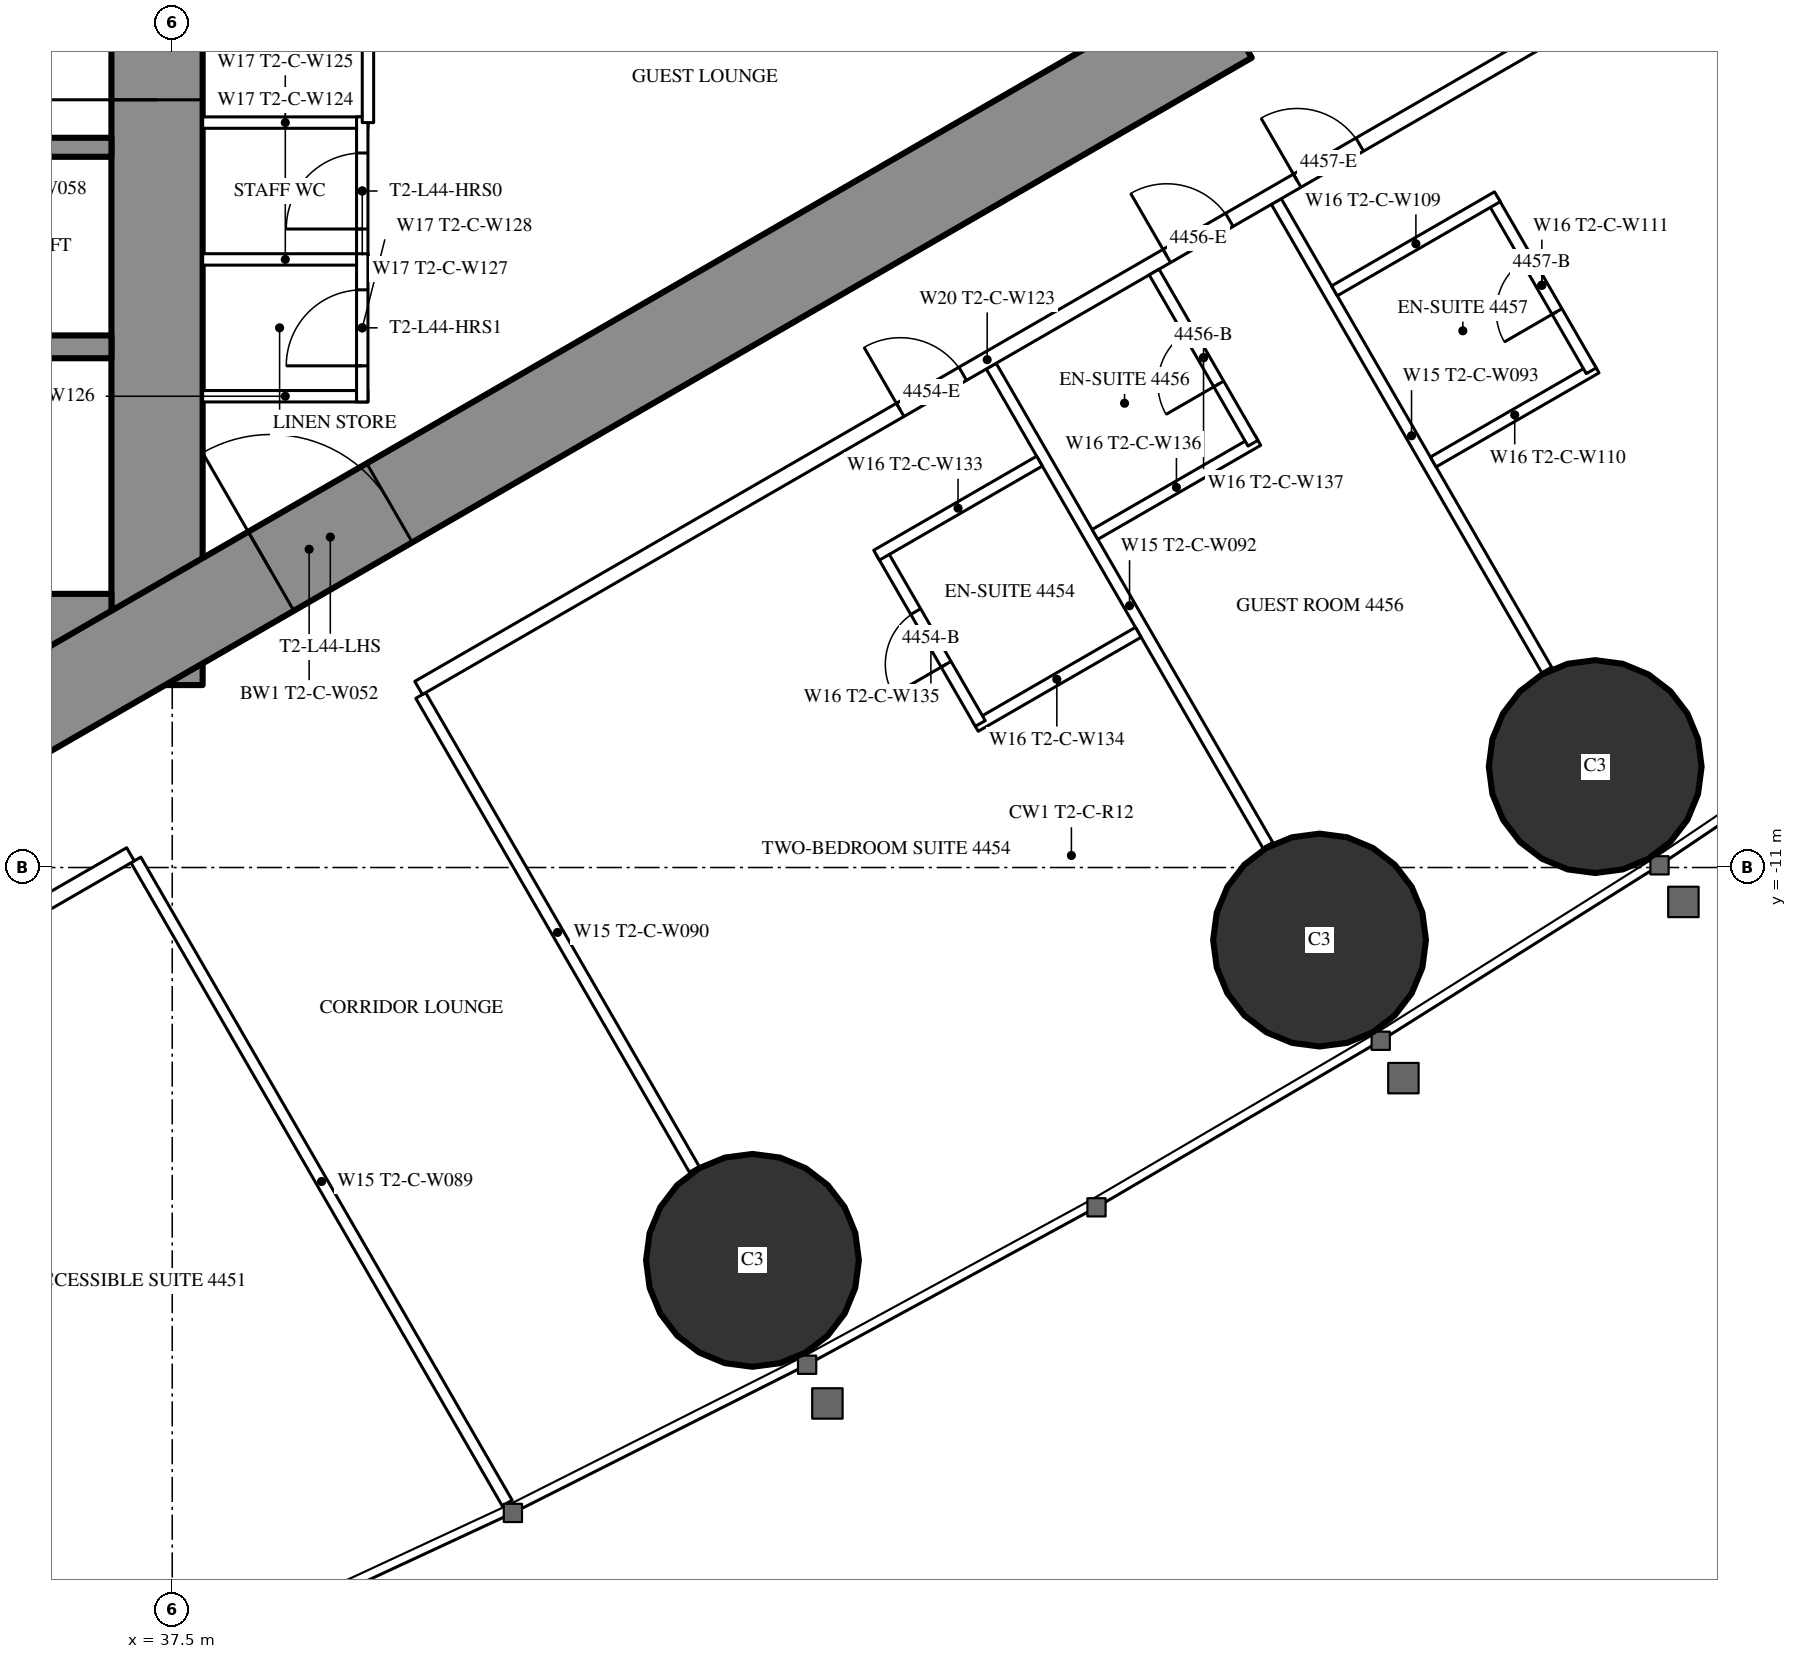
"""IFC4 building model, lengths in metres.
Left out: names, types, materials, properties, quantities, classifications, styles, units other than length and angle.
Written with IfcOpenShell. Run it as: python <this file> out.ifc"""

import sys

from ifc_helpers import new_model, si_unit, direction, frame, frame_2d, origin, origin_2d, place, context, subcontext, project, spatial, rectangle, circle, extrude, element, fill, save


model = new_model("IFC4")
c1 = context("Model", 3, precision=1e-05, world=origin(), true_north=direction((0.0, 1.0)))
c2 = subcontext(c1, "Body", "Model", "MODEL_VIEW")
j1 = project(units=[si_unit("LENGTHUNIT", "METRE"), si_unit("PLANEANGLEUNIT", "RADIAN")], contexts=[c1])
p1 = place(None, origin())
s1 = spatial("IfcSite", under=j1, at=p1, CompositionType="ELEMENT")
p2 = place(p1, origin())
s2 = spatial("IfcBuilding", under=s1, at=p2, CompositionType="ELEMENT")
p3 = place(p2, frame((0.0, 0.0, 166.8)))
s3 = spatial("IfcBuildingStorey", under=s2, at=p3, CompositionType="ELEMENT", Elevation=166.8)
for number, where, z_axis, x_axis in (
    (1, (45.134, -16.168, 0.0), (0.0, 0.0, 1.0), (1.0, 0.0, 0.0)),
    (2, (52.594, -11.955, 0.0), (0.0, 0.0, 1.0), (1.0, 0.0, 0.0)),
    (3, (56.221, -9.672, 0.0), (0.0, 0.0, 1.0), (1.0, 0.0, 0.0)),
):
    element("IfcColumn", number, at=place(p3, frame(where, z_axis=z_axis, x_axis=x_axis)), inside=s3, PredefinedType="COLUMN", context=c2, shape_type="SweptSolid", body=[
        extrude(circle(Radius=1.4, at=origin_2d()), origin(), (0.0, 0.0, 1.0), 3.5),
    ])
p4 = place(p3, frame((37.3, -8.6, 0.0), z_axis=(0.0, 0.0, 1.0), x_axis=(0.0, 1.0, 0.0)))
e4 = element("IfcWall", 4, at=p4, inside=s3, PredefinedType="SHEAR", context=c2, shape_type="SweptSolid", body=[
    extrude(rectangle(XDim=17.2, YDim=1.2, at=frame_2d((8.6, 0.0))), origin(), (0.0, 0.0, 1.0), 3.5),
])
p5 = place(p4, frame((7.7, 0.0, 0.0)))
e5 = element("IfcOpeningElement", 5, at=p5, cuts=e4, PredefinedType="OPENING", context=c2, shape_type="SweptSolid", body=[
    extrude(rectangle(XDim=1.8, YDim=2.2, at=frame_2d((0.9, 1.1))), frame((0.0, 0.61, 0.0), z_axis=(0.0, -1.0, 0.0), x_axis=(1.0, 0.0, 0.0)), (0.0, 0.0, 1.0), 1.22),
])
p6 = place(p3, frame((28.3, -8.0, 0.0), z_axis=(0.0, 0.0, 1.0), x_axis=(1.0, 0.0, 0.0)))
e6 = element("IfcWall", 6, at=p6, inside=s3, PredefinedType="SHEAR", context=c2, shape_type="SweptSolid", body=[
    extrude(rectangle(XDim=8.4, YDim=1.2, at=frame_2d((4.2, 0.0))), origin(), (0.0, 0.0, 1.0), 3.5),
])
p7 = place(p6, frame((0.25, 0.0, 0.0)))
e7 = element("IfcOpeningElement", 7, at=p7, cuts=e6, PredefinedType="OPENING", context=c2, shape_type="SweptSolid", body=[
    extrude(rectangle(XDim=1.0, YDim=2.2, at=frame_2d((0.5, 1.1))), frame((0.0, 0.61, 0.0), z_axis=(0.0, -1.0, 0.0), x_axis=(1.0, 0.0, 0.0)), (0.0, 0.0, 1.0), 1.22),
])
p8 = place(p3, frame((28.3, -4.15, 0.0), z_axis=(0.0, 0.0, 1.0), x_axis=(1.0, 0.0, 0.0)))
e8 = element("IfcWall", 8, at=p8, inside=s3, PredefinedType="SHEAR", context=c2, shape_type="SweptSolid", body=[
    extrude(rectangle(XDim=8.4, YDim=0.3, at=frame_2d((4.2, 0.0))), origin(), (0.0, 0.0, 1.0), 3.5),
])
p9 = place(p3, frame((34.25, -1.525, 0.0), z_axis=(0.0, 0.0, 1.0), x_axis=(1.0, 0.0, 0.0)))
e9 = element("IfcWall", 9, at=p9, inside=s3, PredefinedType="SHEAR", context=c2, shape_type="SweptSolid", body=[
    extrude(rectangle(XDim=2.45, YDim=0.25, at=frame_2d((1.225, 0.0))), origin(), (0.0, 0.0, 1.0), 3.5),
])
p10 = place(p3, frame((27.2, -13.8, 0.0), z_axis=(0.0, 0.0, 1.0), x_axis=(0.866027159892, 0.499996958321, 0.0)))
e10 = element("IfcWall", 10, at=p10, inside=s3, PredefinedType="SHEAR", context=c2, shape_type="SweptSolid", body=[
    extrude(rectangle(XDim=27.947, YDim=1.2, at=frame_2d((13.973, 0.0))), origin(), (0.0, 0.0, 1.0), 3.5),
])
p11 = place(p10, frame((4.6, 0.0, 0.0)))
e11 = element("IfcOpeningElement", 11, at=p11, cuts=e10, PredefinedType="OPENING", context=c2, shape_type="SweptSolid", body=[
    extrude(rectangle(XDim=1.0, YDim=2.2, at=frame_2d((0.5, 1.1))), frame((0.0, 0.61, 0.0), z_axis=(0.0, -1.0, 0.0), x_axis=(1.0, 0.0, 0.0)), (0.0, 0.0, 1.0), 1.22),
])
p12 = place(p10, frame((13.395, 0.0, 0.0)))
e12 = element("IfcOpeningElement", 12, at=p12, cuts=e10, PredefinedType="OPENING", context=c2, shape_type="SweptSolid", body=[
    extrude(rectangle(XDim=1.8, YDim=2.2, at=frame_2d((0.9, 1.1))), frame((0.0, 0.61, 0.0), z_axis=(0.0, -1.0, 0.0), x_axis=(1.0, 0.0, 0.0)), (0.0, 0.0, 1.0), 1.22),
])
p13 = place(p3, frame((37.022, -10.9, 0.0), z_axis=(0.0, 0.0, 1.0), x_axis=(0.499998620953, -0.866026199976, 0.0)))
e13 = element("IfcWall", 13, at=p13, inside=s3, PredefinedType="PARTITIONING", context=c2, shape_type="SweptSolid", body=[
    extrude(rectangle(XDim=9.77, YDim=0.15, at=frame_2d((4.885, 0.0))), origin(), (0.0, 0.0, 1.0), 3.25),
])
p14 = place(p3, frame((40.769, -8.737, 0.0), z_axis=(0.0, 0.0, 1.0), x_axis=(0.500013115284, -0.866017831539, 0.0)))
e14 = element("IfcWall", 14, at=p14, inside=s3, PredefinedType="PARTITIONING", context=c2, shape_type="SweptSolid", body=[
    extrude(rectangle(XDim=7.198, YDim=0.15, at=frame_2d((3.599, 0.0))), origin(), (0.0, 0.0, 1.0), 2.3),
])
p15 = place(p3, frame((48.275, -4.404, 0.0), z_axis=(0.0, 0.0, 1.0), x_axis=(0.500006004368, -0.866021937133, 0.0)))
e15 = element("IfcWall", 15, at=p15, inside=s3, PredefinedType="PARTITIONING", context=c2, shape_type="SweptSolid", body=[
    extrude(rectangle(XDim=7.279, YDim=0.15, at=frame_2d((3.64, 0.0))), origin(), (0.0, 0.0, 1.0), 2.3),
])
p16 = place(p3, frame((52.025, -2.238, 0.0), z_axis=(0.0, 0.0, 1.0), x_axis=(0.499983785035, -0.866034765296, 0.0)))
e16 = element("IfcWall", 16, at=p16, inside=s3, PredefinedType="PARTITIONING", context=c2, shape_type="SweptSolid", body=[
    extrude(rectangle(XDim=7.116, YDim=0.15, at=frame_2d((3.558, 0.0))), origin(), (0.0, 0.0, 1.0), 2.3),
])
p17 = place(p3, frame((27.959, -16.017, 0.0), z_axis=(0.0, 0.0, 1.0), x_axis=(0.866026201739, 0.499998617899, 0.0)))
e17 = element("IfcWall", 17, at=p17, inside=s3, PredefinedType="PARTITIONING", context=c2, shape_type="SweptSolid", body=[
    extrude(rectangle(XDim=10.382, YDim=0.2, at=frame_2d((5.191, 0.0))), origin(), (0.0, 0.0, 1.0), 3.25),
])
p18 = place(p17, frame((3.35, 0.0, 0.0)))
e18 = element("IfcOpeningElement", 18, at=p18, cuts=e17, PredefinedType="OPENING", context=c2, shape_type="SweptSolid", body=[
    extrude(rectangle(XDim=1.0, YDim=2.2, at=frame_2d((0.5, 1.1))), frame((0.0, 0.11, 0.0), z_axis=(0.0, -1.0, 0.0), x_axis=(1.0, 0.0, 0.0)), (0.0, 0.0, 1.0), 0.22),
])
p19 = place(p3, frame((40.741, -8.638, 0.0), z_axis=(0.0, 0.0, 1.0), x_axis=(0.866022967338, 0.500004220025, 0.0)))
e19 = element("IfcWall", 19, at=p19, inside=s3, PredefinedType="PARTITIONING", context=c2, shape_type="SweptSolid", body=[
    extrude(rectangle(XDim=17.276, YDim=0.2, at=frame_2d((8.638, 0.0))), origin(), (0.0, 0.0, 1.0), 3.25),
])
p20 = place(p19, frame((7.316, 0.0, 0.0)))
e20 = element("IfcOpeningElement", 20, at=p20, cuts=e19, PredefinedType="OPENING", context=c2, shape_type="SweptSolid", body=[
    extrude(rectangle(XDim=0.95, YDim=2.2, at=frame_2d((0.475, 1.1))), frame((0.0, 0.11, 0.0), z_axis=(0.0, -1.0, 0.0), x_axis=(1.0, 0.0, 0.0)), (0.0, 0.0, 1.0), 0.22),
])
p21 = place(p19, frame((11.366, 0.0, 0.0)))
e21 = element("IfcOpeningElement", 21, at=p21, cuts=e19, PredefinedType="OPENING", context=c2, shape_type="SweptSolid", body=[
    extrude(rectangle(XDim=0.95, YDim=2.2, at=frame_2d((0.475, 1.1))), frame((0.0, 0.11, 0.0), z_axis=(0.0, -1.0, 0.0), x_axis=(1.0, 0.0, 0.0)), (0.0, 0.0, 1.0), 0.22),
])
p22 = place(p19, frame((13.347, 0.0, 0.0)))
e22 = element("IfcOpeningElement", 22, at=p22, cuts=e19, PredefinedType="OPENING", context=c2, shape_type="SweptSolid", body=[
    extrude(rectangle(XDim=0.95, YDim=2.2, at=frame_2d((0.475, 1.1))), frame((0.0, 0.11, 0.0), z_axis=(0.0, -1.0, 0.0), x_axis=(1.0, 0.0, 0.0)), (0.0, 0.0, 1.0), 0.22),
])
p23 = place(p3, frame((48.066, -9.143, 0.0), z_axis=(0.0, 0.0, 1.0), x_axis=(0.866006523861, 0.500032699561, 0.0)))
e23 = element("IfcWall", 23, at=p23, inside=s3, PredefinedType="PARTITIONING", context=c2, shape_type="SweptSolid", body=[
    extrude(rectangle(XDim=2.475, YDim=0.15, at=frame_2d((1.237, 0.0))), origin(), (0.0, 0.0, 1.0), 3.25),
])
p24 = place(p3, frame((46.831, -6.854, 0.0), z_axis=(0.0, 0.0, 1.0), x_axis=(0.500006934395, -0.866021400173, 0.0)))
e24 = element("IfcWall", 24, at=p24, inside=s3, PredefinedType="PARTITIONING", context=c2, shape_type="SweptSolid", body=[
    extrude(rectangle(XDim=2.6, YDim=0.15, at=frame_2d((1.3, 0.0))), origin(), (0.0, 0.0, 1.0), 3.25),
])
p25 = place(p24, frame((0.9, 0.0, 0.0)))
e25 = element("IfcOpeningElement", 25, at=p25, cuts=e24, PredefinedType="OPENING", context=c2, shape_type="SweptSolid", body=[
    extrude(rectangle(XDim=0.8, YDim=2.2, at=frame_2d((0.4, 1.1))), frame((0.0, 0.085, 0.0), z_axis=(0.0, -1.0, 0.0), x_axis=(1.0, 0.0, 0.0)), (0.0, 0.0, 1.0), 0.17),
])
for number, where, z_axis, x_axis in (
    (26, (46.766, -6.891, 0.0), (0.0, 0.0, 1.0), (0.866, 0.5, 0.0)),
    (27, (49.64, -6.618, 0.0), (0.0, 0.0, 1.0), (0.866, 0.5, 0.0)),
):
    element("IfcWall", number, at=place(p3, frame(where, z_axis=z_axis, x_axis=x_axis)), inside=s3, PredefinedType="PARTITIONING", context=c2, shape_type="SweptSolid", body=[
        extrude(rectangle(XDim=2.475, YDim=0.15, at=frame_2d((1.237, 0.0))), origin(), (0.0, 0.0, 1.0), 3.25),
    ])
p26 = place(p3, frame((50.418, -3.166, 0.0), z_axis=(0.0, 0.0, 1.0), x_axis=(0.499936506574, -0.866062058628, 0.0)))
e28 = element("IfcWall", 28, at=p26, inside=s3, PredefinedType="PARTITIONING", context=c2, shape_type="SweptSolid", body=[
    extrude(rectangle(XDim=2.6, YDim=0.15, at=frame_2d((1.3, 0.0))), origin(), (0.0, 0.0, 1.0), 3.25),
])
p27 = place(p26, frame((0.9, 0.0, 0.0)))
e29 = element("IfcOpeningElement", 29, at=p27, cuts=e28, PredefinedType="OPENING", context=c2, shape_type="SweptSolid", body=[
    extrude(rectangle(XDim=0.8, YDim=2.2, at=frame_2d((0.4, 1.1))), frame((0.0, 0.085, 0.0), z_axis=(0.0, -1.0, 0.0), x_axis=(1.0, 0.0, 0.0)), (0.0, 0.0, 1.0), 0.17),
])
p28 = place(p3, frame((54.09, -5.665, 0.0), z_axis=(0.0, 0.0, 1.0), x_axis=(0.866006523861, 0.500032699561, 0.0)))
e30 = element("IfcWall", 30, at=p28, inside=s3, PredefinedType="PARTITIONING", context=c2, shape_type="SweptSolid", body=[
    extrude(rectangle(XDim=2.475, YDim=0.15, at=frame_2d((1.237, 0.0))), origin(), (0.0, 0.0, 1.0), 3.25),
])
p29 = place(p3, frame((54.869, -2.213, 0.0), z_axis=(0.0, 0.0, 1.0), x_axis=(0.500047596559, -0.865997922154, 0.0)))
e31 = element("IfcWall", 31, at=p29, inside=s3, PredefinedType="PARTITIONING", context=c2, shape_type="SweptSolid", body=[
    extrude(rectangle(XDim=2.6, YDim=0.15, at=frame_2d((1.3, 0.0))), origin(), (0.0, 0.0, 1.0), 3.25),
])
p30 = place(p29, frame((0.9, 0.0, 0.0)))
e32 = element("IfcOpeningElement", 32, at=p30, cuts=e31, PredefinedType="OPENING", context=c2, shape_type="SweptSolid", body=[
    extrude(rectangle(XDim=0.8, YDim=2.2, at=frame_2d((0.4, 1.1))), frame((0.0, 0.085, 0.0), z_axis=(0.0, -1.0, 0.0), x_axis=(1.0, 0.0, 0.0)), (0.0, 0.0, 1.0), 0.17),
])
p31 = place(p3, frame((52.79, -3.413, 0.0), z_axis=(0.0, 0.0, 1.0), x_axis=(0.866006523861, 0.500032699561, 0.0)))
e33 = element("IfcWall", 33, at=p31, inside=s3, PredefinedType="PARTITIONING", context=c2, shape_type="SweptSolid", body=[
    extrude(rectangle(XDim=2.475, YDim=0.15, at=frame_2d((1.237, 0.0))), origin(), (0.0, 0.0, 1.0), 3.25),
])
for number, where, z_axis, x_axis in (
    (34, (37.9, -1.2, 0.0), (0.0, 0.0, 1.0), (1.0, 0.0, 0.0)),
    (35, (37.9, -3.0, 0.0), (0.0, 0.0, 1.0), (1.0, 0.0, 0.0)),
    (36, (37.9, -4.8, 0.0), (0.0, 0.0, 1.0), (1.0, 0.0, 0.0)),
):
    element("IfcWall", number, at=place(p3, frame(where, z_axis=z_axis, x_axis=x_axis)), inside=s3, PredefinedType="PARTITIONING", context=c2, shape_type="SweptSolid", body=[
        extrude(rectangle(XDim=2.175, YDim=0.15, at=frame_2d((1.087, 0.0))), origin(), (0.0, 0.0, 1.0), 3.25),
    ])
p32 = place(p3, frame((40.0, -3.075, 0.0), z_axis=(0.0, 0.0, 1.0), x_axis=(0.0, 1.0, 0.0)))
e37 = element("IfcWall", 37, at=p32, inside=s3, PredefinedType="PARTITIONING", context=c2, shape_type="SweptSolid", body=[
    extrude(rectangle(XDim=1.95, YDim=0.15, at=frame_2d((0.975, 0.0))), origin(), (0.0, 0.0, 1.0), 3.25),
])
p33 = place(p32, frame((0.475, 0.0, 0.0)))
e38 = element("IfcOpeningElement", 38, at=p33, cuts=e37, PredefinedType="OPENING", context=c2, shape_type="SweptSolid", body=[
    extrude(rectangle(XDim=1.0, YDim=2.2, at=frame_2d((0.5, 1.1))), frame((0.0, 0.085, 0.0), z_axis=(0.0, -1.0, 0.0), x_axis=(1.0, 0.0, 0.0)), (0.0, 0.0, 1.0), 0.17),
])
p34 = place(p3, frame((40.0, -4.875, 0.0), z_axis=(0.0, 0.0, 1.0), x_axis=(0.0, 1.0, 0.0)))
e39 = element("IfcWall", 39, at=p34, inside=s3, PredefinedType="PARTITIONING", context=c2, shape_type="SweptSolid", body=[
    extrude(rectangle(XDim=1.95, YDim=0.15, at=frame_2d((0.975, 0.0))), origin(), (0.0, 0.0, 1.0), 3.25),
])
p35 = place(p34, frame((0.475, 0.0, 0.0)))
e40 = element("IfcOpeningElement", 40, at=p35, cuts=e39, PredefinedType="OPENING", context=c2, shape_type="SweptSolid", body=[
    extrude(rectangle(XDim=1.0, YDim=2.2, at=frame_2d((0.5, 1.1))), frame((0.0, 0.085, 0.0), z_axis=(0.0, -1.0, 0.0), x_axis=(1.0, 0.0, 0.0)), (0.0, 0.0, 1.0), 0.17),
])
p36 = place(p3, frame((40.075, -1.2, 0.0), z_axis=(0.0, 0.0, 1.0), x_axis=(0.0, 1.0, 0.0)))
e41 = element("IfcWall", 41, at=p36, inside=s3, PredefinedType="PARTITIONING", context=c2, shape_type="SweptSolid", body=[
    extrude(rectangle(XDim=6.874, YDim=0.15, at=frame_2d((3.437, 0.0))), origin(), (0.0, 0.0, 1.0), 3.25),
])
p37 = place(p36, frame((2.537, 0.0, 0.0)))
e42 = element("IfcOpeningElement", 42, at=p37, cuts=e41, PredefinedType="OPENING", context=c2, shape_type="SweptSolid", body=[
    extrude(rectangle(XDim=1.8, YDim=2.2, at=frame_2d((0.9, 1.1))), frame((0.0, 0.085, 0.0), z_axis=(0.0, -1.0, 0.0), x_axis=(1.0, 0.0, 0.0)), (0.0, 0.0, 1.0), 0.17),
])
p38 = place(p25, origin())
e43 = element("IfcDoor", 43, at=p38, inside=s3, OperationType="SINGLE_SWING_RIGHT", PredefinedType="DOOR", context=c2, shape_type="SweptSolid", body=[
    extrude(rectangle(XDim=0.8, YDim=2.2, at=frame_2d((0.4, 1.1))), frame((0.0, 0.025, 0.0), z_axis=(0.0, -1.0, 0.0), x_axis=(1.0, 0.0, 0.0)), (0.0, 0.0, 1.0), 0.05),
])
fill(e25, e43)
p39 = place(p20, origin())
e44 = element("IfcDoor", 44, at=p39, inside=s3, OperationType="SINGLE_SWING_LEFT", PredefinedType="DOOR", context=c2, shape_type="SweptSolid", body=[
    extrude(rectangle(XDim=0.95, YDim=2.2, at=frame_2d((0.475, 1.1))), frame((0.0, 0.025, 0.0), z_axis=(0.0, -1.0, 0.0), x_axis=(1.0, 0.0, 0.0)), (0.0, 0.0, 1.0), 0.05),
])
fill(e20, e44)
p40 = place(p27, origin())
e45 = element("IfcDoor", 45, at=p40, inside=s3, OperationType="SINGLE_SWING_RIGHT", PredefinedType="DOOR", context=c2, shape_type="SweptSolid", body=[
    extrude(rectangle(XDim=0.8, YDim=2.2, at=frame_2d((0.4, 1.1))), frame((0.0, 0.025, 0.0), z_axis=(0.0, -1.0, 0.0), x_axis=(1.0, 0.0, 0.0)), (0.0, 0.0, 1.0), 0.05),
])
fill(e29, e45)
p41 = place(p21, origin())
e46 = element("IfcDoor", 46, at=p41, inside=s3, OperationType="SINGLE_SWING_LEFT", PredefinedType="DOOR", context=c2, shape_type="SweptSolid", body=[
    extrude(rectangle(XDim=0.95, YDim=2.2, at=frame_2d((0.475, 1.1))), frame((0.0, 0.025, 0.0), z_axis=(0.0, -1.0, 0.0), x_axis=(1.0, 0.0, 0.0)), (0.0, 0.0, 1.0), 0.05),
])
fill(e21, e46)
p42 = place(p30, origin())
e47 = element("IfcDoor", 47, at=p42, inside=s3, OperationType="SINGLE_SWING_RIGHT", PredefinedType="DOOR", context=c2, shape_type="SweptSolid", body=[
    extrude(rectangle(XDim=0.8, YDim=2.2, at=frame_2d((0.4, 1.1))), frame((0.0, 0.025, 0.0), z_axis=(0.0, -1.0, 0.0), x_axis=(1.0, 0.0, 0.0)), (0.0, 0.0, 1.0), 0.05),
])
fill(e32, e47)
p43 = place(p22, origin())
e48 = element("IfcDoor", 48, at=p43, inside=s3, OperationType="SINGLE_SWING_LEFT", PredefinedType="DOOR", context=c2, shape_type="SweptSolid", body=[
    extrude(rectangle(XDim=0.95, YDim=2.2, at=frame_2d((0.475, 1.1))), frame((0.0, 0.025, 0.0), z_axis=(0.0, -1.0, 0.0), x_axis=(1.0, 0.0, 0.0)), (0.0, 0.0, 1.0), 0.05),
])
fill(e22, e48)
p44 = place(p33, origin())
e49 = element("IfcDoor", 49, at=p44, inside=s3, OperationType="SINGLE_SWING_LEFT", PredefinedType="DOOR", context=c2, shape_type="SweptSolid", body=[
    extrude(rectangle(XDim=1.0, YDim=2.2, at=frame_2d((0.5, 1.1))), frame((0.0, 0.025, 0.0), z_axis=(0.0, -1.0, 0.0), x_axis=(1.0, 0.0, 0.0)), (0.0, 0.0, 1.0), 0.05),
])
fill(e38, e49)
p45 = place(p35, origin())
e50 = element("IfcDoor", 50, at=p45, inside=s3, OperationType="SINGLE_SWING_LEFT", PredefinedType="DOOR", context=c2, shape_type="SweptSolid", body=[
    extrude(rectangle(XDim=1.0, YDim=2.2, at=frame_2d((0.5, 1.1))), frame((0.0, 0.025, 0.0), z_axis=(0.0, -1.0, 0.0), x_axis=(1.0, 0.0, 0.0)), (0.0, 0.0, 1.0), 0.05),
])
fill(e40, e50)
p46 = place(p12, origin())
e51 = element("IfcDoor", 51, at=p46, inside=s3, OperationType="DOUBLE_DOOR_SINGLE_SWING", PredefinedType="DOOR", context=c2, shape_type="SweptSolid", body=[
    extrude(rectangle(XDim=1.8, YDim=2.2, at=frame_2d((0.9, 1.1))), frame((0.0, 0.025, 0.0), z_axis=(0.0, -1.0, 0.0), x_axis=(1.0, 0.0, 0.0)), (0.0, 0.0, 1.0), 0.05),
])
fill(e12, e51)
p47 = place(p5, origin())
e52 = element("IfcDoor", 52, at=p47, inside=s3, OperationType="DOUBLE_DOOR_SINGLE_SWING", PredefinedType="DOOR", context=c2, shape_type="SweptSolid", body=[
    extrude(rectangle(XDim=1.8, YDim=2.2, at=frame_2d((0.9, 1.1))), frame((0.0, 0.025, 0.0), z_axis=(0.0, -1.0, 0.0), x_axis=(1.0, 0.0, 0.0)), (0.0, 0.0, 1.0), 0.05),
])
fill(e5, e52)
save(model, sys.argv[1])
